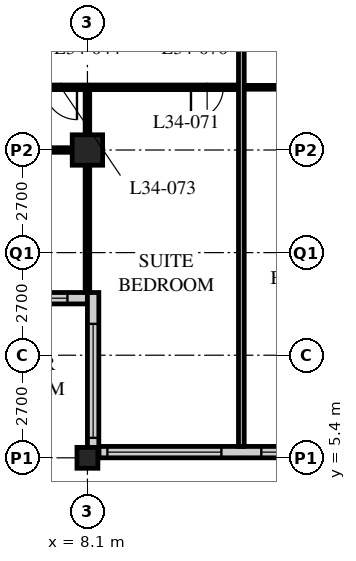
"""IFC4 building model, lengths in metres.
Left out: names, types, materials, properties, quantities, classifications, styles, units other than length and angle.
Written with IfcOpenShell. Run it as: python <this file> out.ifc"""

import sys

from ifc_helpers import new_model, si_unit, direction, frame, frame_2d, origin, origin_2d, place, context, subcontext, project, spatial, rectangle, hollow_rectangle, extrude, element, fill, save


model = new_model("IFC4")
c1 = context("Model", 3, precision=1e-05, world=origin(), true_north=direction((0.0, 1.0)))
c2 = subcontext(c1, "Body", "Model", "MODEL_VIEW")
j1 = project(units=[si_unit("LENGTHUNIT", "METRE"), si_unit("PLANEANGLEUNIT", "RADIAN")], contexts=[c1])
p1 = place(None, origin())
s1 = spatial("IfcSite", under=j1, at=p1, CompositionType="ELEMENT")
p2 = place(p1, origin())
s2 = spatial("IfcBuilding", under=s1, at=p2, CompositionType="ELEMENT")
p3 = place(p2, frame((0.0, 0.0, 134.0)))
s3 = spatial("IfcBuildingStorey", under=s2, at=p3, CompositionType="ELEMENT", Elevation=134.0)
p4 = place(p3, frame((8.1, 5.4, 0.0), z_axis=(0.0, 0.0, 1.0), x_axis=(1.0, 0.0, 0.0)))
e1 = element("IfcColumn", 1, at=p4, inside=s3, PredefinedType="COLUMN", context=c2, shape_type="SweptSolid", body=[
    extrude(hollow_rectangle(XDim=0.55, YDim=0.55, WallThickness=0.04, at=origin_2d()), origin(), (0.0, 0.0, 1.0), 3.4),
])
p5 = place(p3, frame((8.1, 13.5, 0.0), z_axis=(0.0, 0.0, 1.0), x_axis=(1.0, 0.0, 0.0)))
e2 = element("IfcColumn", 2, at=p5, inside=s3, PredefinedType="COLUMN", context=c2, shape_type="SweptSolid", body=[
    extrude(hollow_rectangle(XDim=0.8, YDim=0.8, WallThickness=0.08, at=origin_2d()), origin(), (0.0, 0.0, 1.0), 3.4),
])
p6 = place(p3, frame((8.4, 5.55, 0.0), z_axis=(0.0, 0.0, 1.0), x_axis=(1.0, 0.0, 0.0)))
e3 = element("IfcWall", 3, at=p6, inside=s3, PredefinedType="SOLIDWALL", context=c2, shape_type="SweptSolid", body=[
    extrude(rectangle(XDim=40.2, YDim=0.3, at=frame_2d((20.1, 0.0))), origin(), (0.0, 0.0, 1.0), 3.19),
])
p7 = place(p6, frame((0.225, 0.0, 0.9)))
e4 = element("IfcOpeningElement", 4, at=p7, cuts=e3, PredefinedType="OPENING", context=c2, shape_type="SweptSolid", body=[
    extrude(rectangle(XDim=3.0, YDim=2.0, at=frame_2d((1.5, 1.0))), frame((0.0, 0.16, 0.0), z_axis=(0.0, -1.0, 0.0), x_axis=(1.0, 0.0, 0.0)), (0.0, 0.0, 1.0), 0.32),
])
p8 = place(p6, frame((4.275, 0.0, 0.9)))
e5 = element("IfcOpeningElement", 5, at=p8, cuts=e3, PredefinedType="OPENING", context=c2, shape_type="SweptSolid", body=[
    extrude(rectangle(XDim=3.0, YDim=2.0, at=frame_2d((1.5, 1.0))), frame((0.0, 0.16, 0.0), z_axis=(0.0, -1.0, 0.0), x_axis=(1.0, 0.0, 0.0)), (0.0, 0.0, 1.0), 0.32),
])
p9 = place(p6, frame((8.325, 0.0, 0.9)))
e6 = element("IfcOpeningElement", 6, at=p9, cuts=e3, PredefinedType="OPENING", context=c2, shape_type="SweptSolid", body=[
    extrude(rectangle(XDim=3.0, YDim=2.0, at=frame_2d((1.5, 1.0))), frame((0.0, 0.16, 0.0), z_axis=(0.0, -1.0, 0.0), x_axis=(1.0, 0.0, 0.0)), (0.0, 0.0, 1.0), 0.32),
])
p10 = place(p6, frame((12.375, 0.0, 0.9)))
e7 = element("IfcOpeningElement", 7, at=p10, cuts=e3, PredefinedType="OPENING", context=c2, shape_type="SweptSolid", body=[
    extrude(rectangle(XDim=3.0, YDim=2.0, at=frame_2d((1.5, 1.0))), frame((0.0, 0.16, 0.0), z_axis=(0.0, -1.0, 0.0), x_axis=(1.0, 0.0, 0.0)), (0.0, 0.0, 1.0), 0.32),
])
p11 = place(p6, frame((16.425, 0.0, 0.9)))
e8 = element("IfcOpeningElement", 8, at=p11, cuts=e3, PredefinedType="OPENING", context=c2, shape_type="SweptSolid", body=[
    extrude(rectangle(XDim=3.0, YDim=2.0, at=frame_2d((1.5, 1.0))), frame((0.0, 0.16, 0.0), z_axis=(0.0, -1.0, 0.0), x_axis=(1.0, 0.0, 0.0)), (0.0, 0.0, 1.0), 0.32),
])
p12 = place(p6, frame((20.475, 0.0, 0.9)))
e9 = element("IfcOpeningElement", 9, at=p12, cuts=e3, PredefinedType="OPENING", context=c2, shape_type="SweptSolid", body=[
    extrude(rectangle(XDim=3.0, YDim=2.0, at=frame_2d((1.5, 1.0))), frame((0.0, 0.16, 0.0), z_axis=(0.0, -1.0, 0.0), x_axis=(1.0, 0.0, 0.0)), (0.0, 0.0, 1.0), 0.32),
])
p13 = place(p6, frame((24.525, 0.0, 0.9)))
e10 = element("IfcOpeningElement", 10, at=p13, cuts=e3, PredefinedType="OPENING", context=c2, shape_type="SweptSolid", body=[
    extrude(rectangle(XDim=3.0, YDim=2.0, at=frame_2d((1.5, 1.0))), frame((0.0, 0.16, 0.0), z_axis=(0.0, -1.0, 0.0), x_axis=(1.0, 0.0, 0.0)), (0.0, 0.0, 1.0), 0.32),
])
p14 = place(p6, frame((28.575, 0.0, 0.9)))
e11 = element("IfcOpeningElement", 11, at=p14, cuts=e3, PredefinedType="OPENING", context=c2, shape_type="SweptSolid", body=[
    extrude(rectangle(XDim=3.0, YDim=2.0, at=frame_2d((1.5, 1.0))), frame((0.0, 0.16, 0.0), z_axis=(0.0, -1.0, 0.0), x_axis=(1.0, 0.0, 0.0)), (0.0, 0.0, 1.0), 0.32),
])
p15 = place(p6, frame((32.625, 0.0, 0.9)))
e12 = element("IfcOpeningElement", 12, at=p15, cuts=e3, PredefinedType="OPENING", context=c2, shape_type="SweptSolid", body=[
    extrude(rectangle(XDim=3.0, YDim=2.0, at=frame_2d((1.5, 1.0))), frame((0.0, 0.16, 0.0), z_axis=(0.0, -1.0, 0.0), x_axis=(1.0, 0.0, 0.0)), (0.0, 0.0, 1.0), 0.32),
])
p16 = place(p6, frame((36.675, 0.0, 0.9)))
e13 = element("IfcOpeningElement", 13, at=p16, cuts=e3, PredefinedType="OPENING", context=c2, shape_type="SweptSolid", body=[
    extrude(rectangle(XDim=3.0, YDim=2.0, at=frame_2d((1.5, 1.0))), frame((0.0, 0.16, 0.0), z_axis=(0.0, -1.0, 0.0), x_axis=(1.0, 0.0, 0.0)), (0.0, 0.0, 1.0), 0.32),
])
p17 = place(p3, frame((4.35, 9.6, 0.0), z_axis=(0.0, 0.0, 1.0), x_axis=(1.0, 0.0, 0.0)))
e14 = element("IfcWall", 14, at=p17, inside=s3, PredefinedType="SOLIDWALL", context=c2, shape_type="SweptSolid", body=[
    extrude(rectangle(XDim=3.75, YDim=0.3, at=frame_2d((1.875, 0.0))), origin(), (0.0, 0.0, 1.0), 3.19),
])
p18 = place(p17, frame((0.225, 0.0, 0.9)))
e15 = element("IfcOpeningElement", 15, at=p18, cuts=e14, PredefinedType="OPENING", context=c2, shape_type="SweptSolid", body=[
    extrude(rectangle(XDim=3.0, YDim=1.5, at=frame_2d((1.5, 0.75))), frame((0.0, 0.16, 0.0), z_axis=(0.0, -1.0, 0.0), x_axis=(1.0, 0.0, 0.0)), (0.0, 0.0, 1.0), 0.32),
])
p19 = place(p3, frame((8.25, 9.75, 0.0), z_axis=(0.0, 0.0, 1.0), x_axis=(0.0, -1.0, 0.0)))
e16 = element("IfcWall", 16, at=p19, inside=s3, PredefinedType="SOLIDWALL", context=c2, shape_type="SweptSolid", body=[
    extrude(rectangle(XDim=4.35, YDim=0.3, at=frame_2d((2.175, 0.0))), origin(), (0.0, 0.0, 1.0), 3.19),
])
p20 = place(p19, frame((0.825, 0.0, 0.9)))
e17 = element("IfcOpeningElement", 17, at=p20, cuts=e16, PredefinedType="OPENING", context=c2, shape_type="SweptSolid", body=[
    extrude(rectangle(XDim=3.0, YDim=1.5, at=frame_2d((1.5, 0.75))), frame((0.0, 0.16, 0.0), z_axis=(0.0, -1.0, 0.0), x_axis=(1.0, 0.0, 0.0)), (0.0, 0.0, 1.0), 0.32),
])
p21 = place(p3, frame((12.15, 15.15, 0.0), z_axis=(0.0, 0.0, 1.0), x_axis=(1.0, 0.0, 0.0)))
e18 = element("IfcWall", 18, at=p21, inside=s3, PredefinedType="PARTITIONING", context=c2, shape_type="SweptSolid", body=[
    extrude(rectangle(XDim=2.6, YDim=0.1, at=frame_2d((1.3, 0.0))), origin(), (0.0, 0.0, 1.0), 3.19),
])
p22 = place(p3, frame((4.1, 15.15, 0.0), z_axis=(0.0, 0.0, 1.0), x_axis=(1.0, 0.0, 0.0)))
e19 = element("IfcWall", 19, at=p22, inside=s3, PredefinedType="PARTITIONING", context=c2, shape_type="SweptSolid", body=[
    extrude(rectangle(XDim=8.05, YDim=0.12, at=frame_2d((4.025, 0.0))), origin(), (0.0, 0.0, 1.0), 3.19),
])
p23 = place(p22, frame((6.725, 0.0, 0.0)))
e20 = element("IfcOpeningElement", 20, at=p23, cuts=e19, PredefinedType="OPENING", context=c2, shape_type="SweptSolid", body=[
    extrude(rectangle(XDim=0.85, YDim=2.1, at=frame_2d((0.425, 1.05))), frame((0.0, 0.07, 0.0), z_axis=(0.0, -1.0, 0.0), x_axis=(1.0, 0.0, 0.0)), (0.0, 0.0, 1.0), 0.14),
])
p24 = place(p22, frame((2.875, 0.0, 0.0)))
e21 = element("IfcOpeningElement", 21, at=p24, cuts=e19, PredefinedType="OPENING", context=c2, shape_type="SweptSolid", body=[
    extrude(rectangle(XDim=0.85, YDim=2.1, at=frame_2d((0.425, 1.05))), frame((0.0, 0.07, 0.0), z_axis=(0.0, -1.0, 0.0), x_axis=(1.0, 0.0, 0.0)), (0.0, 0.0, 1.0), 0.14),
])
p25 = place(p3, frame((8.1, 15.15, 0.0), z_axis=(0.0, 0.0, 1.0), x_axis=(0.0, -1.0, 0.0)))
e22 = element("IfcWall", 22, at=p25, inside=s3, PredefinedType="PARTITIONING", context=c2, shape_type="SweptSolid", body=[
    extrude(rectangle(XDim=5.4, YDim=0.12, at=frame_2d((2.7, 0.0))), origin(), (0.0, 0.0, 1.0), 2.578),
])
p26 = place(p3, frame((8.1, 13.5, 0.0), z_axis=(0.0, 0.0, 1.0), x_axis=(-1.0, 0.0, 0.0)))
e23 = element("IfcWall", 23, at=p26, inside=s3, PredefinedType="PARTITIONING", context=c2, shape_type="SweptSolid", body=[
    extrude(rectangle(XDim=3.75, YDim=0.12, at=frame_2d((1.875, 0.0))), origin(), (0.0, 0.0, 1.0), 2.578),
])
p27 = place(p26, frame((1.875, 0.0, 0.0)))
e24 = element("IfcOpeningElement", 24, at=p27, cuts=e23, PredefinedType="OPENING", context=c2, shape_type="SweptSolid", body=[
    extrude(rectangle(XDim=0.85, YDim=2.1, at=frame_2d((0.425, 1.05))), frame((0.0, 0.07, 0.0), z_axis=(0.0, -1.0, 0.0), x_axis=(1.0, 0.0, 0.0)), (0.0, 0.0, 1.0), 0.14),
])
p28 = place(p3, frame((12.15, 17.55, 0.0), z_axis=(0.0, 0.0, 1.0), x_axis=(0.0, -1.0, 0.0)))
e25 = element("IfcWall", 25, at=p28, inside=s3, PredefinedType="PARTITIONING", context=c2, shape_type="SweptSolid", body=[
    extrude(rectangle(XDim=11.85, YDim=0.15, at=frame_2d((5.925, 0.0))), origin(), (0.0, 0.0, 1.0), 3.19),
])
p29 = place(p7, origin())
e26 = element("IfcWindow", 26, at=p29, inside=s3, PartitioningType="SINGLE_PANEL", PredefinedType="WINDOW", context=c2, shape_type="SweptSolid", body=[
    extrude(rectangle(XDim=3.0, YDim=2.0, at=frame_2d((1.5, 1.0))), frame((0.0, 0.03, 0.0), z_axis=(0.0, -1.0, 0.0), x_axis=(1.0, 0.0, 0.0)), (0.0, 0.0, 1.0), 0.06),
])
fill(e4, e26)
p30 = place(p8, origin())
e27 = element("IfcWindow", 27, at=p30, inside=s3, PartitioningType="SINGLE_PANEL", PredefinedType="WINDOW", context=c2, shape_type="SweptSolid", body=[
    extrude(rectangle(XDim=3.0, YDim=2.0, at=frame_2d((1.5, 1.0))), frame((0.0, 0.03, 0.0), z_axis=(0.0, -1.0, 0.0), x_axis=(1.0, 0.0, 0.0)), (0.0, 0.0, 1.0), 0.06),
])
fill(e5, e27)
p31 = place(p18, origin())
e28 = element("IfcWindow", 28, at=p31, inside=s3, PartitioningType="SINGLE_PANEL", PredefinedType="WINDOW", context=c2, shape_type="SweptSolid", body=[
    extrude(rectangle(XDim=3.0, YDim=1.5, at=frame_2d((1.5, 0.75))), frame((0.0, 0.03, 0.0), z_axis=(0.0, -1.0, 0.0), x_axis=(1.0, 0.0, 0.0)), (0.0, 0.0, 1.0), 0.06),
])
fill(e15, e28)
p32 = place(p20, origin())
e29 = element("IfcWindow", 29, at=p32, inside=s3, PartitioningType="SINGLE_PANEL", PredefinedType="WINDOW", context=c2, shape_type="SweptSolid", body=[
    extrude(rectangle(XDim=3.0, YDim=1.5, at=frame_2d((1.5, 0.75))), frame((0.0, 0.03, 0.0), z_axis=(0.0, -1.0, 0.0), x_axis=(1.0, 0.0, 0.0)), (0.0, 0.0, 1.0), 0.06),
])
fill(e17, e29)
p33 = place(p23, origin())
e30 = element("IfcDoor", 30, at=p33, inside=s3, OperationType="SINGLE_SWING_RIGHT", PredefinedType="DOOR", context=c2, shape_type="SweptSolid", body=[
    extrude(rectangle(XDim=0.85, YDim=2.1, at=frame_2d((0.425, 1.05))), frame((0.0, 0.025, 0.0), z_axis=(0.0, -1.0, 0.0), x_axis=(1.0, 0.0, 0.0)), (0.0, 0.0, 1.0), 0.05),
])
fill(e20, e30)
p34 = place(p24, origin())
e31 = element("IfcDoor", 31, at=p34, inside=s3, OperationType="SINGLE_SWING_LEFT", PredefinedType="DOOR", context=c2, shape_type="SweptSolid", body=[
    extrude(rectangle(XDim=0.85, YDim=2.1, at=frame_2d((0.425, 1.05))), frame((0.0, 0.025, 0.0), z_axis=(0.0, -1.0, 0.0), x_axis=(1.0, 0.0, 0.0)), (0.0, 0.0, 1.0), 0.05),
])
fill(e21, e31)
save(model, sys.argv[1])
